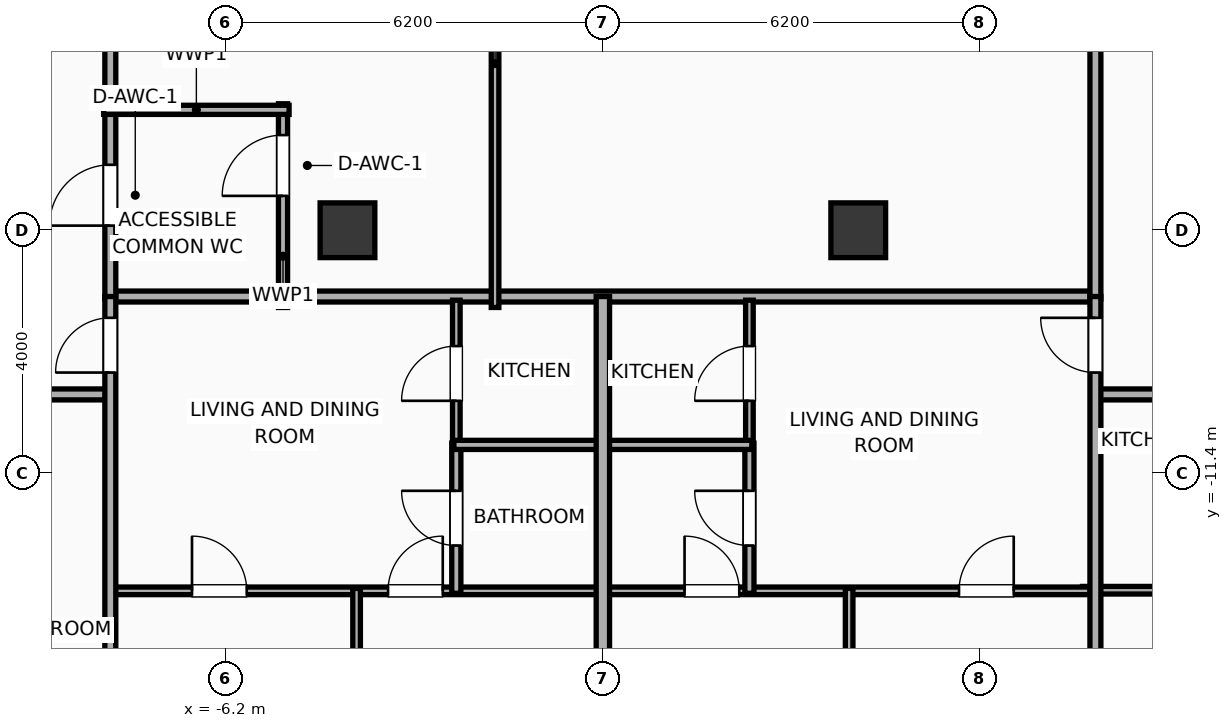
"""IFC4 building model, lengths in metres.
Left out: names, types, materials, properties, quantities, classifications, styles, units other than length and angle.
Written with IfcOpenShell. Run it as: python <this file> out.ifc"""

import sys

from ifc_helpers import new_model, si_unit, direction, frame, frame_2d, origin, origin_2d, place, context, subcontext, project, spatial, rectangle, extrude, element, fill, save


model = new_model("IFC4")
c1 = context("Model", 3, precision=1e-05, world=origin(), true_north=direction((0.0, 1.0)))
c2 = subcontext(c1, "Body", "Model", "MODEL_VIEW")
j1 = project(units=[si_unit("LENGTHUNIT", "METRE"), si_unit("PLANEANGLEUNIT", "RADIAN")], contexts=[c1])
p1 = place(None, origin())
s1 = spatial("IfcSite", under=j1, at=p1, CompositionType="ELEMENT")
p2 = place(p1, origin())
s2 = spatial("IfcBuilding", under=s1, at=p2, CompositionType="ELEMENT")
p3 = place(p2, frame((0.0, 0.0, 271.7)))
s3 = spatial("IfcBuildingStorey", under=s2, at=p3, CompositionType="ELEMENT", Elevation=271.7)
for number, where, z_axis, x_axis in (
    (1, (-4.2, -7.4, 0.0), (0.0, 0.0, 1.0), (1.0, 0.0, 0.0)),
    (2, (4.2, -7.4, 0.0), (0.0, 0.0, 1.0), (1.0, 0.0, 0.0)),
):
    element("IfcColumn", number, at=place(p3, frame(where, z_axis=z_axis, x_axis=x_axis)), inside=s3, PredefinedType="COLUMN", context=c2, shape_type="SweptSolid", body=[
        extrude(rectangle(XDim=0.9, YDim=0.9, at=origin_2d()), origin(), (0.0, 0.0, 1.0), 3.9),
    ])
p4 = place(p3, frame((-8.15, -8.49, 0.0), z_axis=(0.0, 0.0, 1.0), x_axis=(1.0, 0.0, 0.0)))
e3 = element("IfcWall", 3, at=p4, inside=s3, PredefinedType="PARTITIONING", context=c2, shape_type="SweptSolid", body=[
    extrude(rectangle(XDim=16.3, YDim=0.18, at=frame_2d((8.15, 0.0))), origin(), (0.0, 0.0, 1.0), 3.65),
])
p5 = place(p3, frame((-8.1, -8.53, 0.0), z_axis=(0.0, 0.0, 1.0), x_axis=(0.0, 1.0, 0.0)))
e4 = element("IfcWall", 4, at=p5, inside=s3, PredefinedType="PARTITIONING", context=c2, shape_type="SweptSolid", body=[
    extrude(rectangle(XDim=17.06, YDim=0.18, at=frame_2d((8.53, 0.0))), origin(), (0.0, 0.0, 1.0), 3.65),
])
p6 = place(p5, frame((1.206, 0.0, 0.0)))
e5 = element("IfcOpeningElement", 5, at=p6, cuts=e4, PredefinedType="OPENING", context=c2, shape_type="SweptSolid", body=[
    extrude(rectangle(XDim=1.0, YDim=2.05, at=frame_2d((0.5, 1.025))), frame((0.0, 0.1, 0.0), z_axis=(0.0, -1.0, 0.0), x_axis=(1.0, 0.0, 0.0)), (0.0, 0.0, 1.0), 0.2),
])
p7 = place(p5, frame((9.761, 0.0, 0.0)))
e6 = element("IfcOpeningElement", 6, at=p7, cuts=e4, PredefinedType="OPENING", context=c2, shape_type="SweptSolid", body=[
    extrude(rectangle(XDim=0.95, YDim=2.05, at=frame_2d((0.475, 1.025))), frame((0.0, 0.1, 0.0), z_axis=(0.0, -1.0, 0.0), x_axis=(1.0, 0.0, 0.0)), (0.0, 0.0, 1.0), 0.2),
])
p8 = place(p3, frame((8.1, -8.53, 0.0), z_axis=(0.0, 0.0, 1.0), x_axis=(0.0, 1.0, 0.0)))
e7 = element("IfcWall", 7, at=p8, inside=s3, PredefinedType="PARTITIONING", context=c2, shape_type="SweptSolid", body=[
    extrude(rectangle(XDim=17.06, YDim=0.18, at=frame_2d((8.53, 0.0))), origin(), (0.0, 0.0, 1.0), 3.65),
])
p9 = place(p3, frame((-5.26, -8.67, 0.0), z_axis=(0.0, 0.0, 1.0), x_axis=(0.0, 1.0, 0.0)))
e8 = element("IfcWall", 8, at=p9, inside=s3, PredefinedType="PLUMBINGWALL", context=c2, shape_type="SweptSolid", body=[
    extrude(rectangle(XDim=3.35, YDim=0.15, at=frame_2d((1.675, 0.0))), origin(), (0.0, 0.0, 1.0), 3.65),
])
p10 = place(p9, frame((1.835, 0.0, 0.0)))
e9 = element("IfcOpeningElement", 9, at=p10, cuts=e8, PredefinedType="OPENING", context=c2, shape_type="SweptSolid", body=[
    extrude(rectangle(XDim=1.0, YDim=2.05, at=frame_2d((0.5, 1.025))), frame((0.0, 0.085, 0.0), z_axis=(0.0, -1.0, 0.0), x_axis=(1.0, 0.0, 0.0)), (0.0, 0.0, 1.0), 0.17),
])
p11 = place(p3, frame((-8.21, -5.42, 0.0), z_axis=(0.0, 0.0, 1.0), x_axis=(1.0, 0.0, 0.0)))
e10 = element("IfcWall", 10, at=p11, inside=s3, PredefinedType="PLUMBINGWALL", context=c2, shape_type="SweptSolid", body=[
    extrude(rectangle(XDim=3.05, YDim=0.15, at=frame_2d((1.525, 0.0))), origin(), (0.0, 0.0, 1.0), 3.65),
])
p12 = place(p3, frame((-1.773, -8.67, 0.0), z_axis=(0.0, 0.0, 1.0), x_axis=(0.0, 1.0, 0.0)))
e11 = element("IfcWall", 11, at=p12, inside=s3, PredefinedType="PARTITIONING", context=c2, shape_type="SweptSolid", body=[
    extrude(rectangle(XDim=17.29, YDim=0.125, at=frame_2d((8.645, 0.0))), origin(), (0.0, 0.0, 1.0), 3.65),
])
p13 = place(p12, frame((8.17, 0.0, 0.0)))
e12 = element("IfcOpeningElement", 12, at=p13, cuts=e11, PredefinedType="OPENING", context=c2, shape_type="SweptSolid", body=[
    extrude(rectangle(XDim=0.95, YDim=2.05, at=frame_2d((0.475, 1.025))), frame((0.0, 0.073, 0.0), z_axis=(0.0, -1.0, 0.0), x_axis=(1.0, 0.0, 0.0)), (0.0, 0.0, 1.0), 0.145),
])
p14 = place(p3, frame((7.887, -13.32, 0.0), z_axis=(0.0, 0.0, 1.0), x_axis=(1.0, 0.0, 0.0)))
e13 = element("IfcWall", 13, at=p14, inside=s3, PredefinedType="PARTITIONING", context=c2, shape_type="SweptSolid", body=[
    extrude(rectangle(XDim=2.623, YDim=0.125, at=frame_2d((1.311, 0.0))), origin(), (0.0, 0.0, 1.0), 3.65),
])
p15 = place(p3, frame((-30.639, -10.1, 0.0), z_axis=(0.0, 0.0, 1.0), x_axis=(1.0, 0.0, 0.0)))
e14 = element("IfcWall", 14, at=p15, inside=s3, PredefinedType="PARTITIONING", context=c2, shape_type="SweptSolid", body=[
    extrude(rectangle(XDim=22.559, YDim=0.18, at=frame_2d((11.28, 0.0))), origin(), (0.0, 0.0, 1.0), 3.65),
])
p16 = place(p15, frame((2.298, 0.0, 0.0)))
e15 = element("IfcOpeningElement", 15, at=p16, cuts=e14, PredefinedType="OPENING", context=c2, shape_type="SweptSolid", body=[
    extrude(rectangle(XDim=0.9, YDim=2.05, at=frame_2d((0.45, 1.025))), frame((0.0, 0.1, 0.0), z_axis=(0.0, -1.0, 0.0), x_axis=(1.0, 0.0, 0.0)), (0.0, 0.0, 1.0), 0.2),
])
p17 = place(p15, frame((8.812, 0.0, 0.0)))
e16 = element("IfcOpeningElement", 16, at=p17, cuts=e14, PredefinedType="OPENING", context=c2, shape_type="SweptSolid", body=[
    extrude(rectangle(XDim=1.15, YDim=2.05, at=frame_2d((0.575, 1.025))), frame((0.0, 0.1, 0.0), z_axis=(0.0, -1.0, 0.0), x_axis=(1.0, 0.0, 0.0)), (0.0, 0.0, 1.0), 0.2),
])
p18 = place(p15, frame((13.738, 0.0, 0.0)))
e17 = element("IfcOpeningElement", 17, at=p18, cuts=e14, PredefinedType="OPENING", context=c2, shape_type="SweptSolid", body=[
    extrude(rectangle(XDim=0.9, YDim=2.05, at=frame_2d((0.45, 1.025))), frame((0.0, 0.1, 0.0), z_axis=(0.0, -1.0, 0.0), x_axis=(1.0, 0.0, 0.0)), (0.0, 0.0, 1.0), 0.2),
])
p19 = place(p15, frame((20.209, 0.0, 0.0)))
e18 = element("IfcOpeningElement", 18, at=p19, cuts=e14, PredefinedType="OPENING", context=c2, shape_type="SweptSolid", body=[
    extrude(rectangle(XDim=1.15, YDim=2.05, at=frame_2d((0.575, 1.025))), frame((0.0, 0.1, 0.0), z_axis=(0.0, -1.0, 0.0), x_axis=(1.0, 0.0, 0.0)), (0.0, 0.0, 1.0), 0.2),
])
p20 = place(p3, frame((8.08, -10.1, 0.0), z_axis=(0.0, 0.0, 1.0), x_axis=(1.0, 0.0, 0.0)))
e19 = element("IfcWall", 19, at=p20, inside=s3, PredefinedType="PARTITIONING", context=c2, shape_type="SweptSolid", body=[
    extrude(rectangle(XDim=15.236, YDim=0.18, at=frame_2d((7.618, 0.0))), origin(), (0.0, 0.0, 1.0), 3.65),
])
p21 = place(p20, frame((3.4, 0.0, 0.0)))
e20 = element("IfcOpeningElement", 20, at=p21, cuts=e19, PredefinedType="OPENING", context=c2, shape_type="SweptSolid", body=[
    extrude(rectangle(XDim=1.15, YDim=2.05, at=frame_2d((0.575, 1.025))), frame((0.0, 0.1, 0.0), z_axis=(0.0, -1.0, 0.0), x_axis=(1.0, 0.0, 0.0)), (0.0, 0.0, 1.0), 0.2),
])
p22 = place(p20, frame((11.05, 0.0, 0.0)))
e21 = element("IfcOpeningElement", 21, at=p22, cuts=e19, PredefinedType="OPENING", context=c2, shape_type="SweptSolid", body=[
    extrude(rectangle(XDim=1.15, YDim=2.05, at=frame_2d((0.575, 1.025))), frame((0.0, 0.1, 0.0), z_axis=(0.0, -1.0, 0.0), x_axis=(1.0, 0.0, 0.0)), (0.0, 0.0, 1.0), 0.2),
])
p23 = place(p3, frame((-8.08, -13.33, 0.0), z_axis=(0.0, 0.0, 1.0), x_axis=(1.0, 0.0, 0.0)))
e22 = element("IfcWall", 22, at=p23, inside=s3, PredefinedType="PARTITIONING", context=c2, shape_type="SweptSolid", body=[
    extrude(rectangle(XDim=8.06, YDim=0.125, at=frame_2d((4.03, 0.0))), origin(), (0.0, 0.0, 1.0), 3.65),
])
p24 = place(p23, frame((1.323, 0.0, 0.0)))
e23 = element("IfcOpeningElement", 23, at=p24, cuts=e22, PredefinedType="OPENING", context=c2, shape_type="SweptSolid", body=[
    extrude(rectangle(XDim=0.9, YDim=2.05, at=frame_2d((0.45, 1.025))), frame((0.0, 0.073, 0.0), z_axis=(0.0, -1.0, 0.0), x_axis=(1.0, 0.0, 0.0)), (0.0, 0.0, 1.0), 0.145),
])
p25 = place(p23, frame((4.547, 0.0, 0.0)))
e24 = element("IfcOpeningElement", 24, at=p25, cuts=e22, PredefinedType="OPENING", context=c2, shape_type="SweptSolid", body=[
    extrude(rectangle(XDim=0.9, YDim=2.05, at=frame_2d((0.45, 1.025))), frame((0.0, 0.073, 0.0), z_axis=(0.0, -1.0, 0.0), x_axis=(1.0, 0.0, 0.0)), (0.0, 0.0, 1.0), 0.145),
])
p26 = place(p3, frame((-2.41, -10.96, 0.0), z_axis=(0.0, 0.0, 1.0), x_axis=(0.0, 1.0, 0.0)))
e25 = element("IfcWall", 25, at=p26, inside=s3, PredefinedType="PARTITIONING", context=c2, shape_type="SweptSolid", body=[
    extrude(rectangle(XDim=2.41, YDim=0.125, at=frame_2d((1.205, 0.0))), origin(), (0.0, 0.0, 1.0), 3.65),
])
p27 = place(p26, frame((0.755, 0.0, 0.0)))
e26 = element("IfcOpeningElement", 26, at=p27, cuts=e25, PredefinedType="OPENING", context=c2, shape_type="SweptSolid", body=[
    extrude(rectangle(XDim=0.9, YDim=2.05, at=frame_2d((0.45, 1.025))), frame((0.0, 0.073, 0.0), z_axis=(0.0, -1.0, 0.0), x_axis=(1.0, 0.0, 0.0)), (0.0, 0.0, 1.0), 0.145),
])
p28 = place(p3, frame((-2.41, -13.37, 0.0), z_axis=(0.0, 0.0, 1.0), x_axis=(0.0, 1.0, 0.0)))
e27 = element("IfcWall", 27, at=p28, inside=s3, PredefinedType="PLUMBINGWALL", context=c2, shape_type="SweptSolid", body=[
    extrude(rectangle(XDim=2.47, YDim=0.15, at=frame_2d((1.235, 0.0))), origin(), (0.0, 0.0, 1.0), 3.65),
])
p29 = place(p28, frame((0.785, 0.0, 0.0)))
e28 = element("IfcOpeningElement", 28, at=p29, cuts=e27, PredefinedType="OPENING", context=c2, shape_type="SweptSolid", body=[
    extrude(rectangle(XDim=0.9, YDim=2.05, at=frame_2d((0.45, 1.025))), frame((0.0, 0.085, 0.0), z_axis=(0.0, -1.0, 0.0), x_axis=(1.0, 0.0, 0.0)), (0.0, 0.0, 1.0), 0.17),
])
p30 = place(p3, frame((-2.45, -10.93, 0.0), z_axis=(0.0, 0.0, 1.0), x_axis=(1.0, 0.0, 0.0)))
e29 = element("IfcWall", 29, at=p30, inside=s3, PredefinedType="PLUMBINGWALL", context=c2, shape_type="SweptSolid", body=[
    extrude(rectangle(XDim=2.43, YDim=0.15, at=frame_2d((1.215, 0.0))), origin(), (0.0, 0.0, 1.0), 3.65),
])
p31 = place(p3, frame((-4.05, -18.58, 0.0), z_axis=(0.0, 0.0, 1.0), x_axis=(0.0, 1.0, 0.0)))
e30 = element("IfcWall", 30, at=p31, inside=s3, PredefinedType="PARTITIONING", context=c2, shape_type="SweptSolid", body=[
    extrude(rectangle(XDim=5.29, YDim=0.125, at=frame_2d((2.645, 0.0))), origin(), (0.0, 0.0, 1.0), 3.65),
])
p32 = place(p3, frame((-8.1, -18.155, 0.0), z_axis=(0.0, 0.0, 1.0), x_axis=(0.0, 1.0, 0.0)))
e31 = element("IfcWall", 31, at=p32, inside=s3, PredefinedType="PARTITIONING", context=c2, shape_type="SweptSolid", body=[
    extrude(rectangle(XDim=9.665, YDim=0.18, at=frame_2d((4.832, 0.0))), origin(), (0.0, 0.0, 1.0), 3.65),
])
p33 = place(p32, frame((8.414, 0.0, 0.0)))
e32 = element("IfcOpeningElement", 32, at=p33, cuts=e31, PredefinedType="OPENING", context=c2, shape_type="SweptSolid", body=[
    extrude(rectangle(XDim=0.9, YDim=2.05, at=frame_2d((0.45, 1.025))), frame((0.0, 0.1, 0.0), z_axis=(0.0, -1.0, 0.0), x_axis=(1.0, 0.0, 0.0)), (0.0, 0.0, 1.0), 0.2),
])
p34 = place(p3, frame((0.02, -13.33, 0.0), z_axis=(0.0, 0.0, 1.0), x_axis=(1.0, 0.0, 0.0)))
e33 = element("IfcWall", 33, at=p34, inside=s3, PredefinedType="PARTITIONING", context=c2, shape_type="SweptSolid", body=[
    extrude(rectangle(XDim=7.992, YDim=0.125, at=frame_2d((3.996, 0.0))), origin(), (0.0, 0.0, 1.0), 3.65),
])
p35 = place(p34, frame((1.323, 0.0, 0.0)))
e34 = element("IfcOpeningElement", 34, at=p35, cuts=e33, PredefinedType="OPENING", context=c2, shape_type="SweptSolid", body=[
    extrude(rectangle(XDim=0.9, YDim=2.05, at=frame_2d((0.45, 1.025))), frame((0.0, 0.073, 0.0), z_axis=(0.0, -1.0, 0.0), x_axis=(1.0, 0.0, 0.0)), (0.0, 0.0, 1.0), 0.145),
])
p36 = place(p34, frame((5.837, 0.0, 0.0)))
e35 = element("IfcOpeningElement", 35, at=p36, cuts=e33, PredefinedType="OPENING", context=c2, shape_type="SweptSolid", body=[
    extrude(rectangle(XDim=0.9, YDim=2.05, at=frame_2d((0.45, 1.025))), frame((0.0, 0.073, 0.0), z_axis=(0.0, -1.0, 0.0), x_axis=(1.0, 0.0, 0.0)), (0.0, 0.0, 1.0), 0.145),
])
p37 = place(p3, frame((2.41, -10.96, 0.0), z_axis=(0.0, 0.0, 1.0), x_axis=(0.0, 1.0, 0.0)))
e36 = element("IfcWall", 36, at=p37, inside=s3, PredefinedType="PARTITIONING", context=c2, shape_type="SweptSolid", body=[
    extrude(rectangle(XDim=2.41, YDim=0.125, at=frame_2d((1.205, 0.0))), origin(), (0.0, 0.0, 1.0), 3.65),
])
p38 = place(p37, frame((0.755, 0.0, 0.0)))
e37 = element("IfcOpeningElement", 37, at=p38, cuts=e36, PredefinedType="OPENING", context=c2, shape_type="SweptSolid", body=[
    extrude(rectangle(XDim=0.9, YDim=2.05, at=frame_2d((0.45, 1.025))), frame((0.0, 0.073, 0.0), z_axis=(0.0, -1.0, 0.0), x_axis=(1.0, 0.0, 0.0)), (0.0, 0.0, 1.0), 0.145),
])
p39 = place(p3, frame((2.41, -13.37, 0.0), z_axis=(0.0, 0.0, 1.0), x_axis=(0.0, 1.0, 0.0)))
e38 = element("IfcWall", 38, at=p39, inside=s3, PredefinedType="PLUMBINGWALL", context=c2, shape_type="SweptSolid", body=[
    extrude(rectangle(XDim=2.47, YDim=0.15, at=frame_2d((1.235, 0.0))), origin(), (0.0, 0.0, 1.0), 3.09),
])
p40 = place(p39, frame((0.785, 0.0, 0.0)))
e39 = element("IfcOpeningElement", 39, at=p40, cuts=e38, PredefinedType="OPENING", context=c2, shape_type="SweptSolid", body=[
    extrude(rectangle(XDim=0.9, YDim=2.05, at=frame_2d((0.45, 1.025))), frame((0.0, 0.085, 0.0), z_axis=(0.0, -1.0, 0.0), x_axis=(1.0, 0.0, 0.0)), (0.0, 0.0, 1.0), 0.17),
])
p41 = place(p3, frame((0.02, -10.93, 0.0), z_axis=(0.0, 0.0, 1.0), x_axis=(1.0, 0.0, 0.0)))
e40 = element("IfcWall", 40, at=p41, inside=s3, PredefinedType="PLUMBINGWALL", context=c2, shape_type="SweptSolid", body=[
    extrude(rectangle(XDim=2.43, YDim=0.15, at=frame_2d((1.215, 0.0))), origin(), (0.0, 0.0, 1.0), 3.65),
])
p42 = place(p3, frame((4.05, -19.432, 0.0), z_axis=(0.0, 0.0, 1.0), x_axis=(0.0, 1.0, 0.0)))
e41 = element("IfcWall", 41, at=p42, inside=s3, PredefinedType="PARTITIONING", context=c2, shape_type="SweptSolid", body=[
    extrude(rectangle(XDim=6.142, YDim=0.125, at=frame_2d((3.071, 0.0))), origin(), (0.0, 0.0, 1.0), 3.65),
])
p43 = place(p3, frame((8.1, -19.857, 0.0), z_axis=(0.0, 0.0, 1.0), x_axis=(0.0, 1.0, 0.0)))
e42 = element("IfcWall", 42, at=p43, inside=s3, PredefinedType="PARTITIONING", context=c2, shape_type="SweptSolid", body=[
    extrude(rectangle(XDim=11.367, YDim=0.18, at=frame_2d((5.684, 0.0))), origin(), (0.0, 0.0, 1.0), 3.65),
])
p44 = place(p43, frame((10.117, 0.0, 0.0)))
e43 = element("IfcOpeningElement", 43, at=p44, cuts=e42, PredefinedType="OPENING", context=c2, shape_type="SweptSolid", body=[
    extrude(rectangle(XDim=0.9, YDim=2.05, at=frame_2d((0.45, 1.025))), frame((0.0, 0.1, 0.0), z_axis=(0.0, -1.0, 0.0), x_axis=(1.0, 0.0, 0.0)), (0.0, 0.0, 1.0), 0.2),
])
p45 = place(p3, frame((0.0, -19.006, 0.0), z_axis=(0.0, 0.0, 1.0), x_axis=(0.0, 1.0, 0.0)))
e44 = element("IfcWall", 44, at=p45, inside=s3, PredefinedType="PARTITIONING", context=c2, shape_type="SweptSolid", body=[
    extrude(rectangle(XDim=10.516, YDim=0.22, at=frame_2d((5.258, 0.0))), origin(), (0.0, 0.0, 1.0), 3.65),
])
p46 = place(p6, origin())
e45 = element("IfcDoor", 45, at=p46, inside=s3, OperationType="SINGLE_SWING_LEFT", PredefinedType="DOOR", context=c2, shape_type="SweptSolid", body=[
    extrude(rectangle(XDim=1.0, YDim=2.05, at=frame_2d((0.5, 1.025))), frame((0.0, 0.025, 0.0), z_axis=(0.0, -1.0, 0.0), x_axis=(1.0, 0.0, 0.0)), (0.0, 0.0, 1.0), 0.05),
])
fill(e5, e45)
p47 = place(p10, origin())
e46 = element("IfcDoor", 46, at=p47, inside=s3, OperationType="SINGLE_SWING_LEFT", PredefinedType="DOOR", context=c2, shape_type="SweptSolid", body=[
    extrude(rectangle(XDim=1.0, YDim=2.05, at=frame_2d((0.5, 1.025))), frame((0.0, 0.025, 0.0), z_axis=(0.0, -1.0, 0.0), x_axis=(1.0, 0.0, 0.0)), (0.0, 0.0, 1.0), 0.05),
])
fill(e9, e46)
p48 = place(p24, origin())
e47 = element("IfcDoor", 47, at=p48, inside=s3, OperationType="SINGLE_SWING_LEFT", PredefinedType="DOOR", context=c2, shape_type="SweptSolid", body=[
    extrude(rectangle(XDim=0.9, YDim=2.05, at=frame_2d((0.45, 1.025))), frame((0.0, 0.025, 0.0), z_axis=(0.0, -1.0, 0.0), x_axis=(1.0, 0.0, 0.0)), (0.0, 0.0, 1.0), 0.05),
])
fill(e23, e47)
p49 = place(p25, origin())
e48 = element("IfcDoor", 48, at=p49, inside=s3, OperationType="SINGLE_SWING_RIGHT", PredefinedType="DOOR", context=c2, shape_type="SweptSolid", body=[
    extrude(rectangle(XDim=0.9, YDim=2.05, at=frame_2d((0.45, 1.025))), frame((0.0, 0.025, 0.0), z_axis=(0.0, -1.0, 0.0), x_axis=(1.0, 0.0, 0.0)), (0.0, 0.0, 1.0), 0.05),
])
fill(e24, e48)
p50 = place(p27, origin())
e49 = element("IfcDoor", 49, at=p50, inside=s3, OperationType="SINGLE_SWING_LEFT", PredefinedType="DOOR", context=c2, shape_type="SweptSolid", body=[
    extrude(rectangle(XDim=0.9, YDim=2.05, at=frame_2d((0.45, 1.025))), frame((0.0, 0.025, 0.0), z_axis=(0.0, -1.0, 0.0), x_axis=(1.0, 0.0, 0.0)), (0.0, 0.0, 1.0), 0.05),
])
fill(e26, e49)
p51 = place(p29, origin())
e50 = element("IfcDoor", 50, at=p51, inside=s3, OperationType="SINGLE_SWING_RIGHT", PredefinedType="DOOR", context=c2, shape_type="SweptSolid", body=[
    extrude(rectangle(XDim=0.9, YDim=2.05, at=frame_2d((0.45, 1.025))), frame((0.0, 0.025, 0.0), z_axis=(0.0, -1.0, 0.0), x_axis=(1.0, 0.0, 0.0)), (0.0, 0.0, 1.0), 0.05),
])
fill(e28, e50)
p52 = place(p33, origin())
e51 = element("IfcDoor", 51, at=p52, inside=s3, OperationType="SINGLE_SWING_LEFT", PredefinedType="DOOR", context=c2, shape_type="SweptSolid", body=[
    extrude(rectangle(XDim=0.9, YDim=2.05, at=frame_2d((0.45, 1.025))), frame((0.0, 0.025, 0.0), z_axis=(0.0, -1.0, 0.0), x_axis=(1.0, 0.0, 0.0)), (0.0, 0.0, 1.0), 0.05),
])
fill(e32, e51)
p53 = place(p35, origin())
e52 = element("IfcDoor", 52, at=p53, inside=s3, OperationType="SINGLE_SWING_LEFT", PredefinedType="DOOR", context=c2, shape_type="SweptSolid", body=[
    extrude(rectangle(XDim=0.9, YDim=2.05, at=frame_2d((0.45, 1.025))), frame((0.0, 0.025, 0.0), z_axis=(0.0, -1.0, 0.0), x_axis=(1.0, 0.0, 0.0)), (0.0, 0.0, 1.0), 0.05),
])
fill(e34, e52)
p54 = place(p36, origin())
e53 = element("IfcDoor", 53, at=p54, inside=s3, OperationType="SINGLE_SWING_RIGHT", PredefinedType="DOOR", context=c2, shape_type="SweptSolid", body=[
    extrude(rectangle(XDim=0.9, YDim=2.05, at=frame_2d((0.45, 1.025))), frame((0.0, 0.025, 0.0), z_axis=(0.0, -1.0, 0.0), x_axis=(1.0, 0.0, 0.0)), (0.0, 0.0, 1.0), 0.05),
])
fill(e35, e53)
p55 = place(p38, origin())
e54 = element("IfcDoor", 54, at=p55, inside=s3, OperationType="SINGLE_SWING_LEFT", PredefinedType="DOOR", context=c2, shape_type="SweptSolid", body=[
    extrude(rectangle(XDim=0.9, YDim=2.05, at=frame_2d((0.45, 1.025))), frame((0.0, 0.025, 0.0), z_axis=(0.0, -1.0, 0.0), x_axis=(1.0, 0.0, 0.0)), (0.0, 0.0, 1.0), 0.05),
])
fill(e37, e54)
p56 = place(p40, origin())
e55 = element("IfcDoor", 55, at=p56, inside=s3, OperationType="SINGLE_SWING_RIGHT", PredefinedType="DOOR", context=c2, shape_type="SweptSolid", body=[
    extrude(rectangle(XDim=0.9, YDim=2.05, at=frame_2d((0.45, 1.025))), frame((0.0, 0.025, 0.0), z_axis=(0.0, -1.0, 0.0), x_axis=(1.0, 0.0, 0.0)), (0.0, 0.0, 1.0), 0.05),
])
fill(e39, e55)
p57 = place(p44, origin())
e56 = element("IfcDoor", 56, at=p57, inside=s3, OperationType="SINGLE_SWING_RIGHT", PredefinedType="DOOR", context=c2, shape_type="SweptSolid", body=[
    extrude(rectangle(XDim=0.9, YDim=2.05, at=frame_2d((0.45, 1.025))), frame((0.0, 0.025, 0.0), z_axis=(0.0, -1.0, 0.0), x_axis=(1.0, 0.0, 0.0)), (0.0, 0.0, 1.0), 0.05),
])
fill(e43, e56)
save(model, sys.argv[1])
